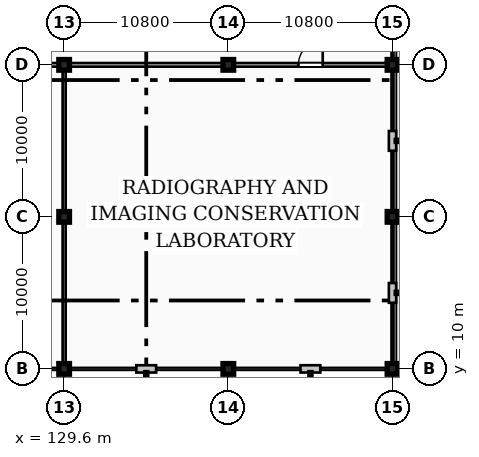
"""IFC4 building model, lengths in metres.
Left out: names, types, materials, properties, quantities, classifications, styles, units other than length and angle.
Written with IfcOpenShell. Run it as: python <this file> out.ifc"""

import sys

from ifc_helpers import new_model, si_unit, direction, frame, frame_2d, origin, origin_2d, place, context, subcontext, project, spatial, polyline, rectangle, outline, extrude, element, fill, save


model = new_model("IFC4")
c1 = context("Model", 3, precision=1e-05, world=origin(), true_north=direction((0.0, 1.0)))
c2 = subcontext(c1, "Body", "Model", "MODEL_VIEW")
j1 = project(units=[si_unit("LENGTHUNIT", "METRE"), si_unit("PLANEANGLEUNIT", "RADIAN")], contexts=[c1])
p1 = place(None, origin())
s1 = spatial("IfcSite", under=j1, at=p1, CompositionType="ELEMENT")
p2 = place(p1, origin())
s2 = spatial("IfcBuilding", under=s1, at=p2, CompositionType="ELEMENT")
p3 = place(p2, frame((0.0, 0.0, 4.8)))
s3 = spatial("IfcBuildingStorey", under=s2, at=p3, CompositionType="ELEMENT", Elevation=4.8)
for number, where, z_axis, x_axis in (
    (1, (129.6, 10.0, 0.0), (0.0, 0.0, 1.0), (1.0, 0.0, 0.0)),
    (2, (129.6, 20.0, 0.0), (0.0, 0.0, 1.0), (1.0, 0.0, 0.0)),
    (3, (129.6, 30.0, 0.0), (0.0, 0.0, 1.0), (1.0, 0.0, 0.0)),
    (4, (140.4, 10.0, 0.0), (0.0, 0.0, 1.0), (1.0, 0.0, 0.0)),
    (5, (140.4, 20.0, 0.0), (0.0, 0.0, 1.0), (1.0, 0.0, 0.0)),
    (6, (140.4, 30.0, 0.0), (0.0, 0.0, 1.0), (1.0, 0.0, 0.0)),
    (7, (151.2, 10.0, 0.0), (0.0, 0.0, 1.0), (1.0, 0.0, 0.0)),
    (8, (151.2, 20.0, 0.0), (0.0, 0.0, 1.0), (1.0, 0.0, 0.0)),
    (9, (151.2, 30.0, 0.0), (0.0, 0.0, 1.0), (1.0, 0.0, 0.0)),
):
    element("IfcColumn", number, at=place(p3, frame(where, z_axis=z_axis, x_axis=x_axis)), inside=s3, PredefinedType="COLUMN", context=c2, shape_type="SweptSolid", body=[
        extrude(rectangle(XDim=0.7, YDim=0.7, at=origin_2d()), origin(), (0.0, 0.0, 1.0), 4.8),
    ])
p4 = place(p3, frame((129.23, 10.0, 0.0), z_axis=(0.0, 0.0, 1.0), x_axis=(1.0, 0.0, 0.0)))
e10 = element("IfcWall", 10, at=p4, inside=s3, PredefinedType="STANDARD", context=c2, shape_type="SweptSolid", body=[
    extrude(rectangle(XDim=0.225, YDim=0.3, at=frame_2d((0.113, 0.0))), origin(), (0.0, 0.0, 1.0), 4.56),
])
p5 = place(p3, frame((134.35, 10.0, 0.0), z_axis=(0.0, 0.0, 1.0), x_axis=(1.0, 0.0, 0.0)))
e11 = element("IfcWall", 11, at=p5, inside=s3, PredefinedType="STANDARD", context=c2, shape_type="SweptSolid", body=[
    extrude(rectangle(XDim=1.3, YDim=0.48, at=frame_2d((0.65, 0.0))), origin(), (0.0, 0.0, 1.0), 4.13),
])
for number, where, z_axis, x_axis in (
    (12, (129.745, 10.0, 0.0), (0.0, 0.0, 1.0), (1.0, 0.0, 0.0)),
    (13, (140.03, 10.0, 0.0), (0.0, 0.0, 1.0), (1.0, 0.0, 0.0)),
):
    element("IfcWall", number, at=place(p3, frame(where, z_axis=z_axis, x_axis=x_axis)), inside=s3, PredefinedType="STANDARD", context=c2, shape_type="SweptSolid", body=[
        extrude(rectangle(XDim=0.225, YDim=0.3, at=frame_2d((0.112, 0.0))), origin(), (0.0, 0.0, 1.0), 4.56),
    ])
p6 = place(p3, frame((145.15, 10.0, 0.0), z_axis=(0.0, 0.0, 1.0), x_axis=(1.0, 0.0, 0.0)))
e14 = element("IfcWall", 14, at=p6, inside=s3, PredefinedType="STANDARD", context=c2, shape_type="SweptSolid", body=[
    extrude(rectangle(XDim=1.3, YDim=0.48, at=frame_2d((0.65, 0.0))), origin(), (0.0, 0.0, 1.0), 4.13),
])
p7 = place(p3, frame((140.545, 10.0, 0.0), z_axis=(0.0, 0.0, 1.0), x_axis=(1.0, 0.0, 0.0)))
e15 = element("IfcWall", 15, at=p7, inside=s3, PredefinedType="STANDARD", context=c2, shape_type="SweptSolid", body=[
    extrude(rectangle(XDim=0.225, YDim=0.3, at=frame_2d((0.113, 0.0))), origin(), (0.0, 0.0, 1.0), 4.56),
])
p8 = place(p3, frame((150.83, 10.0, 0.0), z_axis=(0.0, 0.0, 1.0), x_axis=(1.0, 0.0, 0.0)))
e16 = element("IfcWall", 16, at=p8, inside=s3, PredefinedType="STANDARD", context=c2, shape_type="SweptSolid", body=[
    extrude(rectangle(XDim=0.225, YDim=0.3, at=frame_2d((0.112, 0.0))), origin(), (0.0, 0.0, 1.0), 4.56),
])
p9 = place(p3, frame((151.2, 14.35, 0.0), z_axis=(0.0, 0.0, 1.0), x_axis=(0.0, 1.0, 0.0)))
e17 = element("IfcWall", 17, at=p9, inside=s3, PredefinedType="STANDARD", context=c2, shape_type="SweptSolid", body=[
    extrude(rectangle(XDim=1.3, YDim=0.48, at=frame_2d((0.65, 0.0))), origin(), (0.0, 0.0, 1.0), 4.13),
])
for number, where, z_axis, x_axis in (
    (18, (151.2, 10.145, 0.0), (0.0, 0.0, 1.0), (0.0, 1.0, 0.0)),
    (19, (151.2, 19.63, 0.0), (0.0, 0.0, 1.0), (0.0, 1.0, 0.0)),
):
    element("IfcWall", number, at=place(p3, frame(where, z_axis=z_axis, x_axis=x_axis)), inside=s3, PredefinedType="STANDARD", context=c2, shape_type="SweptSolid", body=[
        extrude(rectangle(XDim=0.225, YDim=0.3, at=frame_2d((0.113, 0.0))), origin(), (0.0, 0.0, 1.0), 4.56),
    ])
p10 = place(p3, frame((151.2, 24.35, 0.0), z_axis=(0.0, 0.0, 1.0), x_axis=(0.0, 1.0, 0.0)))
e20 = element("IfcWall", 20, at=p10, inside=s3, PredefinedType="STANDARD", context=c2, shape_type="SweptSolid", body=[
    extrude(rectangle(XDim=1.3, YDim=0.48, at=frame_2d((0.65, 0.0))), origin(), (0.0, 0.0, 1.0), 4.13),
])
for number, where, z_axis, x_axis in (
    (21, (151.2, 20.145, 0.0), (0.0, 0.0, 1.0), (0.0, 1.0, 0.0)),
    (22, (151.2, 29.63, 0.0), (0.0, 0.0, 1.0), (0.0, 1.0, 0.0)),
    (23, (151.2, 30.145, 0.0), (0.0, 0.0, 1.0), (0.0, 1.0, 0.0)),
):
    element("IfcWall", number, at=place(p3, frame(where, z_axis=z_axis, x_axis=x_axis)), inside=s3, PredefinedType="STANDARD", context=c2, shape_type="SweptSolid", body=[
        extrude(rectangle(XDim=0.225, YDim=0.3, at=frame_2d((0.113, 0.0))), origin(), (0.0, 0.0, 1.0), 4.56),
    ])
p11 = place(p3, frame((151.55, 10.0, -0.02), z_axis=(0.0, 0.0, 1.0), x_axis=(1.0, 0.0, 0.0)))
e24 = element("IfcWall", 24, at=p11, inside=s3, PredefinedType="STANDARD", context=c2, shape_type="SweptSolid", body=[
    extrude(outline(polyline([(0.0, 0.0), (10.25, 0.0), (10.25, 0.04), (0.0, 1.12), (0.0, 0.0)])), frame((0.0, 0.14, 0.0), z_axis=(0.0, -1.0, 0.0), x_axis=(1.0, 0.0, 0.0)), (0.0, 0.0, 1.0), 0.28),
])
p12 = place(p3, frame((118.98, 30.0, 0.0), z_axis=(0.0, 0.0, 1.0), x_axis=(1.0, 0.0, 0.0)))
e25 = element("IfcWall", 25, at=p12, inside=s3, PredefinedType="SOLIDWALL", context=c2, shape_type="SweptSolid", body=[
    extrude(rectangle(XDim=10.42, YDim=0.24, at=frame_2d((5.21, 0.0))), origin(), (0.0, 0.0, 1.0), 3.83),
])
p13 = place(p12, frame((4.7, 0.0, 0.0)))
e26 = element("IfcOpeningElement", 26, at=p13, cuts=e25, PredefinedType="OPENING", context=c2, shape_type="SweptSolid", body=[
    extrude(rectangle(XDim=1.02, YDim=2.2, at=frame_2d((0.51, 1.1))), frame((0.0, 0.13, 0.0), z_axis=(0.0, -1.0, 0.0), x_axis=(1.0, 0.0, 0.0)), (0.0, 0.0, 1.0), 0.26),
])
p14 = place(p3, frame((129.8, 30.0, 0.0), z_axis=(0.0, 0.0, 1.0), x_axis=(1.0, 0.0, 0.0)))
e27 = element("IfcWall", 27, at=p14, inside=s3, PredefinedType="SOLIDWALL", context=c2, shape_type="SweptSolid", body=[
    extrude(rectangle(XDim=10.4, YDim=0.24, at=frame_2d((5.2, 0.0))), origin(), (0.0, 0.0, 1.0), 3.83),
])
p15 = place(p3, frame((140.6, 30.0, 0.0), z_axis=(0.0, 0.0, 1.0), x_axis=(1.0, 0.0, 0.0)))
e28 = element("IfcWall", 28, at=p15, inside=s3, PredefinedType="SOLIDWALL", context=c2, shape_type="SweptSolid", body=[
    extrude(rectangle(XDim=10.42, YDim=0.24, at=frame_2d((5.21, 0.0))), origin(), (0.0, 0.0, 1.0), 4.13),
])
p16 = place(p15, frame((4.41, 0.0, 0.0)))
e29 = element("IfcOpeningElement", 29, at=p16, cuts=e28, PredefinedType="OPENING", context=c2, shape_type="SweptSolid", body=[
    extrude(rectangle(XDim=1.6, YDim=2.3, at=frame_2d((0.8, 1.15))), frame((0.0, 0.13, 0.0), z_axis=(0.0, -1.0, 0.0), x_axis=(1.0, 0.0, 0.0)), (0.0, 0.0, 1.0), 0.26),
])
p17 = place(p3, frame((129.6, 10.18, 0.0), z_axis=(0.0, 0.0, 1.0), x_axis=(0.0, 1.0, 0.0)))
e30 = element("IfcWall", 30, at=p17, inside=s3, PredefinedType="SOLIDWALL", context=c2, shape_type="SweptSolid", body=[
    extrude(rectangle(XDim=9.62, YDim=0.2, at=frame_2d((4.81, 0.0))), origin(), (0.0, 0.0, 1.0), 4.13),
])
p18 = place(p3, frame((129.6, 20.2, 0.0), z_axis=(0.0, 0.0, 1.0), x_axis=(0.0, 1.0, 0.0)))
e31 = element("IfcWall", 31, at=p18, inside=s3, PredefinedType="SOLIDWALL", context=c2, shape_type="SweptSolid", body=[
    extrude(rectangle(XDim=9.6, YDim=0.2, at=frame_2d((4.8, 0.0))), origin(), (0.0, 0.0, 1.0), 3.969),
])
p19 = place(p16, origin())
e32 = element("IfcDoor", 32, at=p19, inside=s3, OperationType="SINGLE_SWING_RIGHT", PredefinedType="DOOR", context=c2, shape_type="SweptSolid", body=[
    extrude(rectangle(XDim=1.6, YDim=2.3, at=frame_2d((0.8, 1.15))), frame((0.0, 0.025, 0.0), z_axis=(0.0, -1.0, 0.0), x_axis=(1.0, 0.0, 0.0)), (0.0, 0.0, 1.0), 0.05),
])
fill(e29, e32)
save(model, sys.argv[1])
